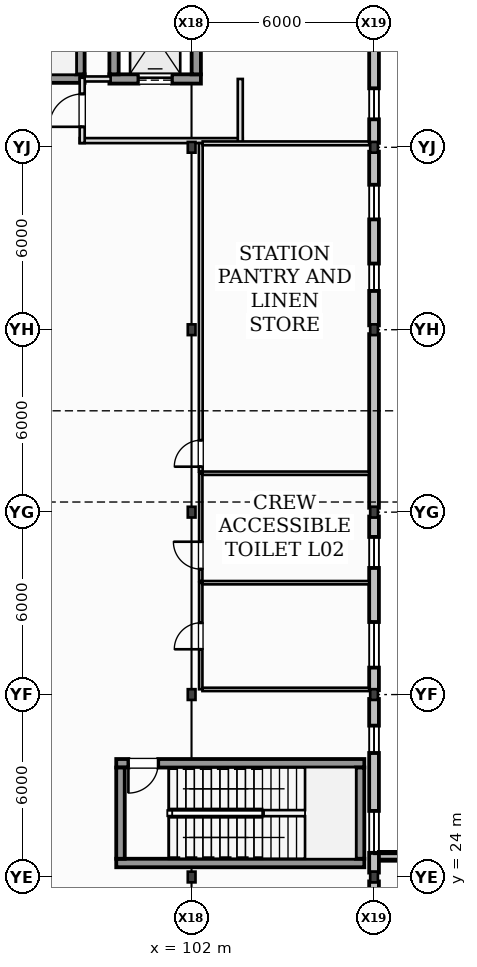
"""IFC4 building model, lengths in metres.
Left out: names, types, materials, properties, quantities, classifications, styles, units other than length and angle.
Written with IfcOpenShell. Run it as: python <this file> out.ifc"""

import sys

from ifc_helpers import new_model, si_unit, direction, frame, frame_2d, origin, origin_2d, place, context, subcontext, project, spatial, rectangle, i_section, extrude, element, fill, save


model = new_model("IFC4")
c1 = context("Model", 3, precision=1e-05, world=origin(), true_north=direction((0.0, 1.0)))
c2 = subcontext(c1, "Body", "Model", "MODEL_VIEW")
j1 = project(units=[si_unit("LENGTHUNIT", "METRE"), si_unit("PLANEANGLEUNIT", "RADIAN")], contexts=[c1])
p1 = place(None, origin())
s1 = spatial("IfcSite", under=j1, at=p1, CompositionType="ELEMENT")
p2 = place(p1, origin())
s2 = spatial("IfcBuilding", under=s1, at=p2, CompositionType="ELEMENT")
p3 = place(p2, frame((0.0, 0.0, 6.0)))
s3 = spatial("IfcBuildingStorey", under=s2, at=p3, CompositionType="ELEMENT", Elevation=6.0)
for number, where, z_axis, x_axis in (
    (1, (102.0, 24.0, 0.0), (0.0, 0.0, 1.0), (1.0, 0.0, 0.0)),
    (2, (102.0, 30.0, 0.0), (0.0, 0.0, 1.0), (1.0, 0.0, 0.0)),
    (3, (102.0, 36.0, 0.0), (0.0, 0.0, 1.0), (1.0, 0.0, 0.0)),
    (4, (102.0, 42.0, 0.0), (0.0, 0.0, 1.0), (1.0, 0.0, 0.0)),
    (5, (102.0, 48.0, 0.0), (0.0, 0.0, 1.0), (1.0, 0.0, 0.0)),
    (6, (108.0, 24.0, 0.0), (0.0, 0.0, 1.0), (1.0, 0.0, 0.0)),
    (7, (108.0, 30.0, 0.0), (0.0, 0.0, 1.0), (1.0, 0.0, 0.0)),
    (8, (108.0, 36.0, 0.0), (0.0, 0.0, 1.0), (1.0, 0.0, 0.0)),
    (9, (108.0, 42.0, 0.0), (0.0, 0.0, 1.0), (1.0, 0.0, 0.0)),
    (10, (108.0, 48.0, 0.0), (0.0, 0.0, 1.0), (1.0, 0.0, 0.0)),
):
    element("IfcColumn", number, at=place(p3, frame(where, z_axis=z_axis, x_axis=x_axis)), inside=s3, PredefinedType="COLUMN", context=c2, shape_type="SweptSolid", body=[
        extrude(i_section(OverallWidth=0.254, OverallDepth=0.353, WebThickness=0.01, FlangeThickness=0.016, at=origin_2d()), origin(), (0.0, 0.0, 1.0), 4.0),
    ])
p4 = place(p3, frame((108.0, 18.145, 0.0), z_axis=(0.0, 0.0, 1.0), x_axis=(0.0, 1.0, 0.0)))
e11 = element("IfcWall", 11, at=p4, inside=s3, PredefinedType="STANDARD", context=c2, shape_type="SweptSolid", body=[
    extrude(rectangle(XDim=5.71, YDim=0.32, at=frame_2d((2.855, 0.0))), origin(), (0.0, 0.0, 1.0), 4.0),
])
p5 = place(p4, frame((0.897, 0.0, 0.86)))
e12 = element("IfcOpeningElement", 12, at=p5, cuts=e11, PredefinedType="OPENING", context=c2, shape_type="SweptSolid", body=[
    extrude(rectangle(XDim=1.26, YDim=1.26, at=frame_2d((0.63, 0.63))), frame((0.0, 0.17, 0.0), z_axis=(0.0, -1.0, 0.0), x_axis=(1.0, 0.0, 0.0)), (0.0, 0.0, 1.0), 0.34),
])
p6 = place(p4, frame((3.357, 0.0, 1.42)))
e13 = element("IfcOpeningElement", 13, at=p6, cuts=e11, PredefinedType="OPENING", context=c2, shape_type="SweptSolid", body=[
    extrude(rectangle(XDim=1.5, YDim=1.5, at=frame_2d((0.75, 0.75))), frame((0.0, 0.17, 0.0), z_axis=(0.0, -1.0, 0.0), x_axis=(1.0, 0.0, 0.0)), (0.0, 0.0, 1.0), 0.34),
])
p7 = place(p3, frame((108.0, 24.145, 0.0), z_axis=(0.0, 0.0, 1.0), x_axis=(0.0, 1.0, 0.0)))
e14 = element("IfcWall", 14, at=p7, inside=s3, PredefinedType="STANDARD", context=c2, shape_type="SweptSolid", body=[
    extrude(rectangle(XDim=5.71, YDim=0.32, at=frame_2d((2.855, 0.0))), origin(), (0.0, 0.0, 1.0), 3.157),
])
p8 = place(p7, frame((0.649, 0.0, 1.18)))
e15 = element("IfcOpeningElement", 15, at=p8, cuts=e14, PredefinedType="OPENING", context=c2, shape_type="SweptSolid", body=[
    extrude(rectangle(XDim=1.38, YDim=1.38, at=frame_2d((0.69, 0.69))), frame((0.0, 0.17, 0.0), z_axis=(0.0, -1.0, 0.0), x_axis=(1.0, 0.0, 0.0)), (0.0, 0.0, 1.0), 0.34),
])
p9 = place(p7, frame((3.933, 0.0, 0.96)))
e16 = element("IfcOpeningElement", 16, at=p9, cuts=e14, PredefinedType="OPENING", context=c2, shape_type="SweptSolid", body=[
    extrude(rectangle(XDim=0.9, YDim=0.9, at=frame_2d((0.45, 0.45))), frame((0.0, 0.17, 0.0), z_axis=(0.0, -1.0, 0.0), x_axis=(1.0, 0.0, 0.0)), (0.0, 0.0, 1.0), 0.34),
])
p10 = place(p3, frame((108.0, 30.145, 0.0), z_axis=(0.0, 0.0, 1.0), x_axis=(0.0, 1.0, 0.0)))
e17 = element("IfcWall", 17, at=p10, inside=s3, PredefinedType="STANDARD", context=c2, shape_type="SweptSolid", body=[
    extrude(rectangle(XDim=5.71, YDim=0.32, at=frame_2d((2.855, 0.0))), origin(), (0.0, 0.0, 1.0), 3.157),
])
p11 = place(p10, frame((0.741, 0.0, 0.82)))
e18 = element("IfcOpeningElement", 18, at=p11, cuts=e17, PredefinedType="OPENING", context=c2, shape_type="SweptSolid", body=[
    extrude(rectangle(XDim=1.5, YDim=1.5, at=frame_2d((0.75, 0.75))), frame((0.0, 0.17, 0.0), z_axis=(0.0, -1.0, 0.0), x_axis=(1.0, 0.0, 0.0)), (0.0, 0.0, 1.0), 0.34),
])
p12 = place(p10, frame((4.02, 0.0, 1.28)))
e19 = element("IfcOpeningElement", 19, at=p12, cuts=e17, PredefinedType="OPENING", context=c2, shape_type="SweptSolid", body=[
    extrude(rectangle(XDim=1.02, YDim=1.02, at=frame_2d((0.51, 0.51))), frame((0.0, 0.17, 0.0), z_axis=(0.0, -1.0, 0.0), x_axis=(1.0, 0.0, 0.0)), (0.0, 0.0, 1.0), 0.34),
])
p13 = place(p3, frame((108.0, 36.145, 0.0), z_axis=(0.0, 0.0, 1.0), x_axis=(0.0, 1.0, 0.0)))
e20 = element("IfcWall", 20, at=p13, inside=s3, PredefinedType="STANDARD", context=c2, shape_type="SweptSolid", body=[
    extrude(rectangle(XDim=5.71, YDim=0.32, at=frame_2d((2.855, 0.0))), origin(), (0.0, 0.0, 1.0), 3.157),
])
p14 = place(p3, frame((108.0, 42.145, 0.0), z_axis=(0.0, 0.0, 1.0), x_axis=(0.0, 1.0, 0.0)))
e21 = element("IfcWall", 21, at=p14, inside=s3, PredefinedType="STANDARD", context=c2, shape_type="SweptSolid", body=[
    extrude(rectangle(XDim=5.71, YDim=0.32, at=frame_2d((2.855, 0.0))), origin(), (0.0, 0.0, 1.0), 3.157),
])
p15 = place(p14, frame((1.131, 0.0, 1.28)))
e22 = element("IfcOpeningElement", 22, at=p15, cuts=e21, PredefinedType="OPENING", context=c2, shape_type="SweptSolid", body=[
    extrude(rectangle(XDim=0.9, YDim=0.9, at=frame_2d((0.45, 0.45))), frame((0.0, 0.17, 0.0), z_axis=(0.0, -1.0, 0.0), x_axis=(1.0, 0.0, 0.0)), (0.0, 0.0, 1.0), 0.34),
])
p16 = place(p14, frame((3.483, 0.0, 1.18)))
e23 = element("IfcOpeningElement", 23, at=p16, cuts=e21, PredefinedType="OPENING", context=c2, shape_type="SweptSolid", body=[
    extrude(rectangle(XDim=1.14, YDim=1.14, at=frame_2d((0.57, 0.57))), frame((0.0, 0.17, 0.0), z_axis=(0.0, -1.0, 0.0), x_axis=(1.0, 0.0, 0.0)), (0.0, 0.0, 1.0), 0.34),
])
p17 = place(p3, frame((108.0, 48.145, 0.0), z_axis=(0.0, 0.0, 1.0), x_axis=(0.0, 1.0, 0.0)))
e24 = element("IfcWall", 24, at=p17, inside=s3, PredefinedType="STANDARD", context=c2, shape_type="SweptSolid", body=[
    extrude(rectangle(XDim=5.71, YDim=0.32, at=frame_2d((2.855, 0.0))), origin(), (0.0, 0.0, 1.0), 3.157),
])
p18 = place(p17, frame((0.775, 0.0, 0.86)))
e25 = element("IfcOpeningElement", 25, at=p18, cuts=e24, PredefinedType="OPENING", context=c2, shape_type="SweptSolid", body=[
    extrude(rectangle(XDim=1.02, YDim=1.02, at=frame_2d((0.51, 0.51))), frame((0.0, 0.17, 0.0), z_axis=(0.0, -1.0, 0.0), x_axis=(1.0, 0.0, 0.0)), (0.0, 0.0, 1.0), 0.34),
])
p19 = place(p17, frame((3.699, 0.0, 1.42)))
e26 = element("IfcOpeningElement", 26, at=p19, cuts=e24, PredefinedType="OPENING", context=c2, shape_type="SweptSolid", body=[
    extrude(rectangle(XDim=1.26, YDim=1.26, at=frame_2d((0.63, 0.63))), frame((0.0, 0.17, 0.0), z_axis=(0.0, -1.0, 0.0), x_axis=(1.0, 0.0, 0.0)), (0.0, 0.0, 1.0), 0.34),
])
p20 = place(p3, frame((112.04, 24.68, 0.0), z_axis=(0.0, 0.0, 1.0), x_axis=(-1.0, 0.0, 0.0)))
e27 = element("IfcWall", 27, at=p20, inside=s3, PredefinedType="STANDARD", context=c2, shape_type="SweptSolid", body=[
    extrude(rectangle(XDim=3.88, YDim=0.29, at=frame_2d((1.94, 0.0))), origin(), (0.0, 0.0, 1.0), 0.56),
])
p21 = place(p3, frame((90.32, 50.26, 0.0), z_axis=(0.0, 0.0, 1.0), x_axis=(1.0, 0.0, 0.0)))
e28 = element("IfcWall", 28, at=p21, inside=s3, PredefinedType="SHEAR", context=c2, shape_type="SweptSolid", body=[
    extrude(rectangle(XDim=8.16, YDim=0.28, at=frame_2d((4.08, 0.0))), origin(), (0.0, 0.0, 1.0), 4.0),
])
p22 = place(p21, frame((0.65, 0.0, 0.0)))
e29 = element("IfcOpeningElement", 29, at=p22, cuts=e28, PredefinedType="OPENING", context=c2, shape_type="SweptSolid", body=[
    extrude(rectangle(XDim=0.98, YDim=2.15, at=frame_2d((0.49, 1.075))), frame((0.0, 0.15, 0.0), z_axis=(0.0, -1.0, 0.0), x_axis=(1.0, 0.0, 0.0)), (0.0, 0.0, 1.0), 0.3),
])
p23 = place(p3, frame((98.34, 50.4, 0.0), z_axis=(0.0, 0.0, 1.0), x_axis=(0.0, 1.0, 0.0)))
e30 = element("IfcWall", 30, at=p23, inside=s3, PredefinedType="SHEAR", context=c2, shape_type="SweptSolid", body=[
    extrude(rectangle(XDim=3.0, YDim=0.28, at=frame_2d((1.5, 0.0))), origin(), (0.0, 0.0, 1.0), 4.0),
])
p24 = place(p3, frame((99.52, 24.46, 0.0), z_axis=(0.0, 0.0, 1.0), x_axis=(1.0, 0.0, 0.0)))
e31 = element("IfcWall", 31, at=p24, inside=s3, PredefinedType="SHEAR", context=c2, shape_type="SweptSolid", body=[
    extrude(rectangle(XDim=8.16, YDim=0.28, at=frame_2d((4.08, 0.0))), origin(), (0.0, 0.0, 1.0), 4.0),
])
p25 = place(p3, frame((107.68, 27.74, 0.0), z_axis=(0.0, 0.0, 1.0), x_axis=(-1.0, 0.0, 0.0)))
e32 = element("IfcWall", 32, at=p25, inside=s3, PredefinedType="SHEAR", context=c2, shape_type="SweptSolid", body=[
    extrude(rectangle(XDim=8.16, YDim=0.28, at=frame_2d((4.08, 0.0))), origin(), (0.0, 0.0, 1.0), 4.0),
])
p26 = place(p25, frame((6.78, 0.0, 0.0)))
e33 = element("IfcOpeningElement", 33, at=p26, cuts=e32, PredefinedType="OPENING", context=c2, shape_type="SweptSolid", body=[
    extrude(rectangle(XDim=0.98, YDim=2.15, at=frame_2d((0.49, 1.075))), frame((0.0, 0.15, 0.0), z_axis=(0.0, -1.0, 0.0), x_axis=(1.0, 0.0, 0.0)), (0.0, 0.0, 1.0), 0.3),
])
for number, where, z_axis, x_axis in (
    (34, (99.66, 27.6, 0.0), (0.0, 0.0, 1.0), (0.0, -1.0, 0.0)),
    (35, (107.54, 24.6, 0.0), (0.0, 0.0, 1.0), (0.0, 1.0, 0.0)),
):
    element("IfcWall", number, at=place(p3, frame(where, z_axis=z_axis, x_axis=x_axis)), inside=s3, PredefinedType="SHEAR", context=c2, shape_type="SweptSolid", body=[
        extrude(rectangle(XDim=3.0, YDim=0.28, at=frame_2d((1.5, 0.0))), origin(), (0.0, 0.0, 1.0), 4.0),
    ])
p27 = place(p3, frame((99.295, 50.248, 0.0), z_axis=(0.0, 0.0, 1.0), x_axis=(1.0, 0.0, 0.0)))
e36 = element("IfcWall", 36, at=p27, inside=s3, PredefinedType="SHEAR", context=c2, shape_type="SweptSolid", body=[
    extrude(rectangle(XDim=3.01, YDim=0.305, at=frame_2d((1.505, 0.0))), origin(), (0.0, 0.0, 1.0), 4.0),
])
p28 = place(p27, frame((0.955, 0.0, 0.0)))
e37 = element("IfcOpeningElement", 37, at=p28, cuts=e36, PredefinedType="OPENING", context=c2, shape_type="SweptSolid", body=[
    extrude(rectangle(XDim=1.1, YDim=2.15, at=frame_2d((0.55, 1.075))), frame((0.0, 0.162, 0.0), z_axis=(0.0, -1.0, 0.0), x_axis=(1.0, 0.0, 0.0)), (0.0, 0.0, 1.0), 0.325),
])
for number, where, z_axis, x_axis in (
    (38, (99.448, 53.4, 0.0), (0.0, 0.0, 1.0), (0.0, -1.0, 0.0)),
    (39, (102.153, 50.4, 0.0), (0.0, 0.0, 1.0), (0.0, 1.0, 0.0)),
):
    element("IfcWall", number, at=place(p3, frame(where, z_axis=z_axis, x_axis=x_axis)), inside=s3, PredefinedType="SHEAR", context=c2, shape_type="SweptSolid", body=[
        extrude(rectangle(XDim=3.0, YDim=0.305, at=frame_2d((1.5, 0.0))), origin(), (0.0, 0.0, 1.0), 4.0),
    ])
p29 = place(p3, frame((98.32, 48.22, 0.0), z_axis=(0.0, 0.0, 1.0), x_axis=(1.0, 0.0, 0.0)))
e40 = element("IfcWall", 40, at=p29, inside=s3, PredefinedType="PARTITIONING", context=c2, shape_type="SweptSolid", body=[
    extrude(rectangle(XDim=5.36, YDim=0.165, at=frame_2d((2.68, 0.0))), origin(), (0.0, 0.0, 1.0), 3.153),
])
p30 = place(p3, frame((103.6, 48.14, 0.0), z_axis=(0.0, 0.0, 1.0), x_axis=(0.0, 1.0, 0.0)))
e41 = element("IfcWall", 41, at=p30, inside=s3, PredefinedType="PARTITIONING", context=c2, shape_type="SweptSolid", body=[
    extrude(rectangle(XDim=2.108, YDim=0.165, at=frame_2d((1.054, 0.0))), origin(), (0.0, 0.0, 1.0), 3.72),
])
p31 = place(p3, frame((98.32, 50.248, 0.0), z_axis=(0.0, 0.0, 1.0), x_axis=(1.0, 0.0, 0.0)))
e42 = element("IfcWall", 42, at=p31, inside=s3, PredefinedType="PARTITIONING", context=c2, shape_type="SweptSolid", body=[
    extrude(rectangle(XDim=1.015, YDim=0.165, at=frame_2d((0.507, 0.0))), origin(), (0.0, 0.0, 1.0), 3.72),
])
p32 = place(p3, frame((98.4, 48.14, 0.0), z_axis=(0.0, 0.0, 1.0), x_axis=(0.0, 1.0, 0.0)))
e43 = element("IfcWall", 43, at=p32, inside=s3, PredefinedType="PARTITIONING", context=c2, shape_type="SweptSolid", body=[
    extrude(rectangle(XDim=2.148, YDim=0.165, at=frame_2d((1.074, 0.0))), origin(), (0.0, 0.0, 1.0), 3.72),
])
p33 = place(p32, frame((0.534, 0.0, 0.0)))
e44 = element("IfcOpeningElement", 44, at=p33, cuts=e43, PredefinedType="OPENING", context=c2, shape_type="SweptSolid", body=[
    extrude(rectangle(XDim=1.08, YDim=2.14, at=frame_2d((0.54, 1.07))), frame((0.0, 0.093, 0.0), z_axis=(0.0, -1.0, 0.0), x_axis=(1.0, 0.0, 0.0)), (0.0, 0.0, 1.0), 0.185),
])
p34 = place(p3, frame((102.3, 30.175, 0.0), z_axis=(0.0, 0.0, 1.0), x_axis=(0.0, 1.0, 0.0)))
e45 = element("IfcWall", 45, at=p34, inside=s3, PredefinedType="PARTITIONING", context=c2, shape_type="SweptSolid", body=[
    extrude(rectangle(XDim=3.5, YDim=0.11, at=frame_2d((1.75, 0.0))), origin(), (0.0, 0.0, 1.0), 3.157),
])
p35 = place(p34, frame((1.315, 0.0, 0.0)))
e46 = element("IfcOpeningElement", 46, at=p35, cuts=e45, PredefinedType="OPENING", context=c2, shape_type="SweptSolid", body=[
    extrude(rectangle(XDim=0.87, YDim=2.06, at=frame_2d((0.435, 1.03))), frame((0.0, 0.065, 0.0), z_axis=(0.0, -1.0, 0.0), x_axis=(1.0, 0.0, 0.0)), (0.0, 0.0, 1.0), 0.13),
])
p36 = place(p3, frame((102.355, 33.68, 0.0), z_axis=(0.0, 0.0, 1.0), x_axis=(1.0, 0.0, 0.0)))
e47 = element("IfcWall", 47, at=p36, inside=s3, PredefinedType="PARTITIONING", context=c2, shape_type="SweptSolid", body=[
    extrude(rectangle(XDim=5.485, YDim=0.11, at=frame_2d((2.743, 0.0))), origin(), (0.0, 0.0, 1.0), 3.72),
])
p37 = place(p3, frame((107.84, 30.17, 0.0), z_axis=(0.0, 0.0, 1.0), x_axis=(-1.0, 0.0, 0.0)))
e48 = element("IfcWall", 48, at=p37, inside=s3, PredefinedType="PARTITIONING", context=c2, shape_type="SweptSolid", body=[
    extrude(rectangle(XDim=5.485, YDim=0.11, at=frame_2d((2.743, 0.0))), origin(), (0.0, 0.0, 1.0), 3.153),
])
p38 = place(p3, frame((102.3, 33.735, 0.0), z_axis=(0.0, 0.0, 1.0), x_axis=(0.0, 1.0, 0.0)))
e49 = element("IfcWall", 49, at=p38, inside=s3, PredefinedType="PARTITIONING", context=c2, shape_type="SweptSolid", body=[
    extrude(rectangle(XDim=3.54, YDim=0.11, at=frame_2d((1.77, 0.0))), origin(), (0.0, 0.0, 1.0), 3.157),
])
p39 = place(p38, frame((0.392, 0.0, 0.0)))
e50 = element("IfcOpeningElement", 50, at=p39, cuts=e49, PredefinedType="OPENING", context=c2, shape_type="SweptSolid", body=[
    extrude(rectangle(XDim=0.9, YDim=2.1, at=frame_2d((0.45, 1.05))), frame((0.0, 0.065, 0.0), z_axis=(0.0, -1.0, 0.0), x_axis=(1.0, 0.0, 0.0)), (0.0, 0.0, 1.0), 0.13),
])
p40 = place(p3, frame((102.355, 37.28, 0.0), z_axis=(0.0, 0.0, 1.0), x_axis=(1.0, 0.0, 0.0)))
e51 = element("IfcWall", 51, at=p40, inside=s3, PredefinedType="PARTITIONING", context=c2, shape_type="SweptSolid", body=[
    extrude(rectangle(XDim=5.485, YDim=0.11, at=frame_2d((2.743, 0.0))), origin(), (0.0, 0.0, 1.0), 3.72),
])
p41 = place(p3, frame((102.3, 37.335, 0.0), z_axis=(0.0, 0.0, 1.0), x_axis=(0.0, 1.0, 0.0)))
e52 = element("IfcWall", 52, at=p41, inside=s3, PredefinedType="PARTITIONING", context=c2, shape_type="SweptSolid", body=[
    extrude(rectangle(XDim=10.802, YDim=0.125, at=frame_2d((5.401, 0.0))), origin(), (0.0, 0.0, 1.0), 3.157),
])
p42 = place(p41, frame((0.16, 0.0, 0.0)))
e53 = element("IfcOpeningElement", 53, at=p42, cuts=e52, PredefinedType="OPENING", context=c2, shape_type="SweptSolid", body=[
    extrude(rectangle(XDim=0.87, YDim=2.06, at=frame_2d((0.435, 1.03))), frame((0.0, 0.073, 0.0), z_axis=(0.0, -1.0, 0.0), x_axis=(1.0, 0.0, 0.0)), (0.0, 0.0, 1.0), 0.145),
])
p43 = place(p3, frame((102.363, 48.13, 0.0), z_axis=(0.0, 0.0, 1.0), x_axis=(1.0, 0.0, 0.0)))
e54 = element("IfcWall", 54, at=p43, inside=s3, PredefinedType="PARTITIONING", context=c2, shape_type="SweptSolid", body=[
    extrude(rectangle(XDim=5.478, YDim=0.125, at=frame_2d((2.739, 0.0))), origin(), (0.0, 0.0, 1.0), 3.153),
])
p44 = place(p8, origin())
e55 = element("IfcWindow", 55, at=p44, inside=s3, PartitioningType="SINGLE_PANEL", PredefinedType="WINDOW", context=c2, shape_type="SweptSolid", body=[
    extrude(rectangle(XDim=1.38, YDim=1.38, at=frame_2d((0.69, 0.69))), frame((0.0, 0.03, 0.0), z_axis=(0.0, -1.0, 0.0), x_axis=(1.0, 0.0, 0.0)), (0.0, 0.0, 1.0), 0.06),
])
fill(e15, e55)
p45 = place(p9, origin())
e56 = element("IfcWindow", 56, at=p45, inside=s3, PartitioningType="SINGLE_PANEL", PredefinedType="WINDOW", context=c2, shape_type="SweptSolid", body=[
    extrude(rectangle(XDim=0.9, YDim=0.9, at=frame_2d((0.45, 0.45))), frame((0.0, 0.03, 0.0), z_axis=(0.0, -1.0, 0.0), x_axis=(1.0, 0.0, 0.0)), (0.0, 0.0, 1.0), 0.06),
])
fill(e16, e56)
p46 = place(p11, origin())
e57 = element("IfcWindow", 57, at=p46, inside=s3, PartitioningType="SINGLE_PANEL", PredefinedType="WINDOW", context=c2, shape_type="SweptSolid", body=[
    extrude(rectangle(XDim=1.5, YDim=1.5, at=frame_2d((0.75, 0.75))), frame((0.0, 0.03, 0.0), z_axis=(0.0, -1.0, 0.0), x_axis=(1.0, 0.0, 0.0)), (0.0, 0.0, 1.0), 0.06),
])
fill(e18, e57)
p47 = place(p12, origin())
e58 = element("IfcWindow", 58, at=p47, inside=s3, PartitioningType="SINGLE_PANEL", PredefinedType="WINDOW", context=c2, shape_type="SweptSolid", body=[
    extrude(rectangle(XDim=1.02, YDim=1.02, at=frame_2d((0.51, 0.51))), frame((0.0, 0.03, 0.0), z_axis=(0.0, -1.0, 0.0), x_axis=(1.0, 0.0, 0.0)), (0.0, 0.0, 1.0), 0.06),
])
fill(e19, e58)
p48 = place(p15, origin())
e59 = element("IfcWindow", 59, at=p48, inside=s3, PartitioningType="SINGLE_PANEL", PredefinedType="WINDOW", context=c2, shape_type="SweptSolid", body=[
    extrude(rectangle(XDim=0.9, YDim=0.9, at=frame_2d((0.45, 0.45))), frame((0.0, 0.03, 0.0), z_axis=(0.0, -1.0, 0.0), x_axis=(1.0, 0.0, 0.0)), (0.0, 0.0, 1.0), 0.06),
])
fill(e22, e59)
p49 = place(p16, origin())
e60 = element("IfcWindow", 60, at=p49, inside=s3, PartitioningType="SINGLE_PANEL", PredefinedType="WINDOW", context=c2, shape_type="SweptSolid", body=[
    extrude(rectangle(XDim=1.14, YDim=1.14, at=frame_2d((0.57, 0.57))), frame((0.0, 0.03, 0.0), z_axis=(0.0, -1.0, 0.0), x_axis=(1.0, 0.0, 0.0)), (0.0, 0.0, 1.0), 0.06),
])
fill(e23, e60)
p50 = place(p18, origin())
e61 = element("IfcWindow", 61, at=p50, inside=s3, PartitioningType="SINGLE_PANEL", PredefinedType="WINDOW", context=c2, shape_type="SweptSolid", body=[
    extrude(rectangle(XDim=1.02, YDim=1.02, at=frame_2d((0.51, 0.51))), frame((0.0, 0.03, 0.0), z_axis=(0.0, -1.0, 0.0), x_axis=(1.0, 0.0, 0.0)), (0.0, 0.0, 1.0), 0.06),
])
fill(e25, e61)
p51 = place(p26, origin())
e62 = element("IfcDoor", 62, at=p51, inside=s3, OperationType="SINGLE_SWING_RIGHT", PredefinedType="DOOR", context=c2, shape_type="SweptSolid", body=[
    extrude(rectangle(XDim=0.98, YDim=2.15, at=frame_2d((0.49, 1.075))), frame((0.0, 0.025, 0.0), z_axis=(0.0, -1.0, 0.0), x_axis=(1.0, 0.0, 0.0)), (0.0, 0.0, 1.0), 0.05),
])
fill(e33, e62)
p52 = place(p28, origin())
e63 = element("IfcDoor", 63, at=p52, inside=s3, OperationType="SLIDING_TO_LEFT", PredefinedType="DOOR", context=c2, shape_type="SweptSolid", body=[
    extrude(rectangle(XDim=1.1, YDim=2.15, at=frame_2d((0.55, 1.075))), frame((0.0, 0.025, 0.0), z_axis=(0.0, -1.0, 0.0), x_axis=(1.0, 0.0, 0.0)), (0.0, 0.0, 1.0), 0.05),
])
fill(e37, e63)
p53 = place(p33, frame((1.08, 0.0, 0.0), z_axis=(0.0, 0.0, 1.0), x_axis=(-1.0, 0.0, 0.0)))
e64 = element("IfcDoor", 64, at=p53, inside=s3, OperationType="SINGLE_SWING_LEFT", PredefinedType="DOOR", context=c2, shape_type="SweptSolid", body=[
    extrude(rectangle(XDim=1.08, YDim=2.14, at=frame_2d((0.54, 1.07))), frame((0.0, 0.025, 0.0), z_axis=(0.0, -1.0, 0.0), x_axis=(1.0, 0.0, 0.0)), (0.0, 0.0, 1.0), 0.05),
])
fill(e44, e64)
p54 = place(p35, frame((0.87, 0.0, 0.0), z_axis=(0.0, 0.0, 1.0), x_axis=(-1.0, 0.0, 0.0)))
e65 = element("IfcDoor", 65, at=p54, inside=s3, OperationType="SINGLE_SWING_LEFT", PredefinedType="DOOR", context=c2, shape_type="SweptSolid", body=[
    extrude(rectangle(XDim=0.87, YDim=2.06, at=frame_2d((0.435, 1.03))), frame((0.0, 0.025, 0.0), z_axis=(0.0, -1.0, 0.0), x_axis=(1.0, 0.0, 0.0)), (0.0, 0.0, 1.0), 0.05),
])
fill(e46, e65)
p55 = place(p39, frame((0.9, 0.0, 0.0), z_axis=(0.0, 0.0, 1.0), x_axis=(-1.0, 0.0, 0.0)))
e66 = element("IfcDoor", 66, at=p55, inside=s3, OperationType="SINGLE_SWING_RIGHT", PredefinedType="DOOR", context=c2, shape_type="SweptSolid", body=[
    extrude(rectangle(XDim=0.9, YDim=2.1, at=frame_2d((0.45, 1.05))), frame((0.0, 0.025, 0.0), z_axis=(0.0, -1.0, 0.0), x_axis=(1.0, 0.0, 0.0)), (0.0, 0.0, 1.0), 0.05),
])
fill(e50, e66)
p56 = place(p42, frame((0.87, 0.0, 0.0), z_axis=(0.0, 0.0, 1.0), x_axis=(-1.0, 0.0, 0.0)))
e67 = element("IfcDoor", 67, at=p56, inside=s3, OperationType="SINGLE_SWING_LEFT", PredefinedType="DOOR", context=c2, shape_type="SweptSolid", body=[
    extrude(rectangle(XDim=0.87, YDim=2.06, at=frame_2d((0.435, 1.03))), frame((0.0, 0.025, 0.0), z_axis=(0.0, -1.0, 0.0), x_axis=(1.0, 0.0, 0.0)), (0.0, 0.0, 1.0), 0.05),
])
fill(e53, e67)
save(model, sys.argv[1])
